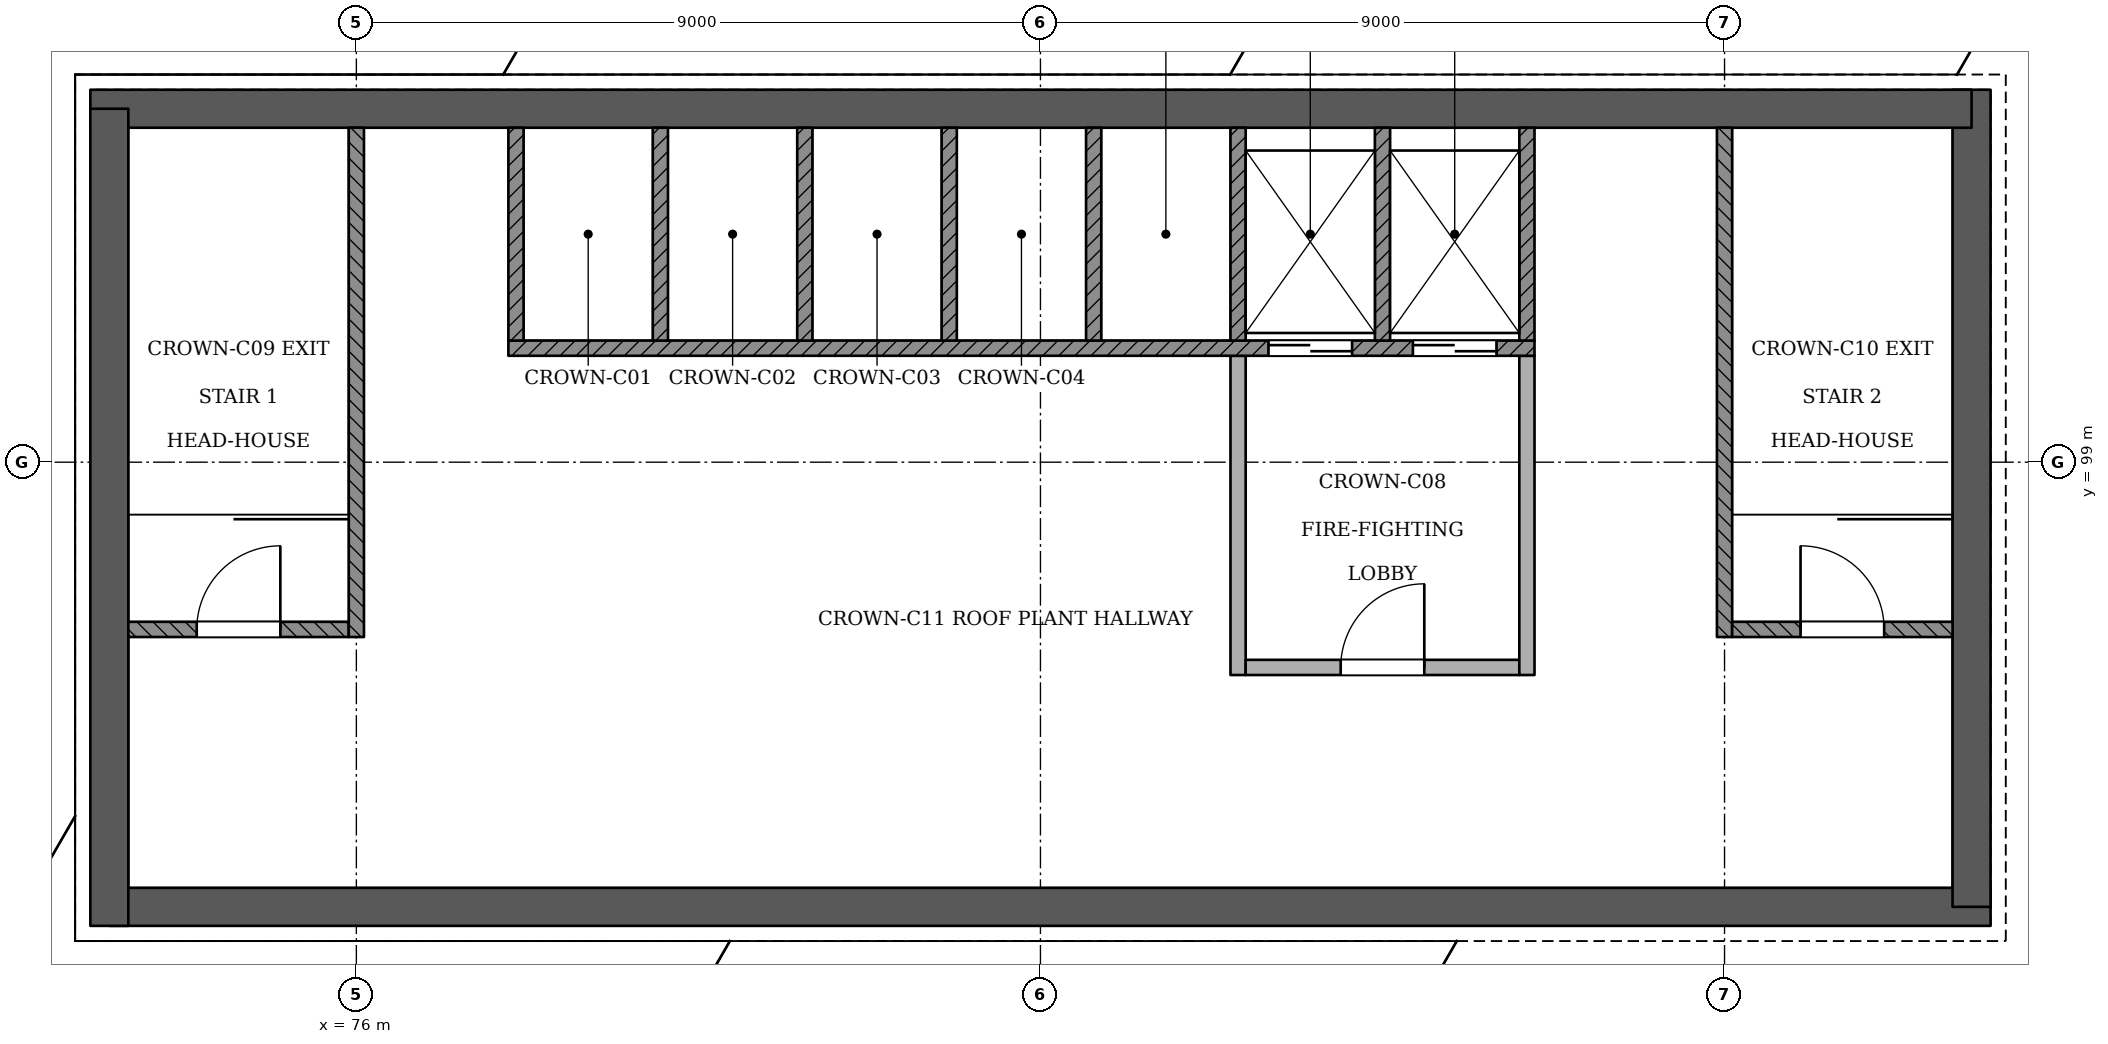
"""IFC4 building model, lengths in metres.
Left out: names, types, materials, properties, quantities, classifications, styles, units other than length and angle.
Written with IfcOpenShell. Run it as: python <this file> out.ifc"""

import sys

from ifc_helpers import new_model, si_unit, direction, frame, frame_2d, origin, place, context, subcontext, project, spatial, rectangle, extrude, element, fill, save


model = new_model("IFC4")
c1 = context("Model", 3, precision=1e-05, world=origin(), true_north=direction((0.0, 1.0)))
c2 = subcontext(c1, "Body", "Model", "MODEL_VIEW")
j1 = project(units=[si_unit("LENGTHUNIT", "METRE"), si_unit("PLANEANGLEUNIT", "RADIAN")], contexts=[c1])
p1 = place(None, origin())
s1 = spatial("IfcSite", under=j1, at=p1, CompositionType="ELEMENT")
p2 = place(p1, origin())
s2 = spatial("IfcBuilding", under=s1, at=p2, CompositionType="ELEMENT")
p3 = place(p2, frame((0.0, 0.0, 358.0)))
s3 = spatial("IfcBuildingStorey", under=s2, at=p3, CompositionType="ELEMENT", Elevation=358.0)
p4 = place(p3, frame((72.75, 93.15, 0.0), z_axis=(0.0, 0.0, 1.0), x_axis=(1.0, 0.0, 0.0)))
e1 = element("IfcWall", 1, at=p4, inside=s3, PredefinedType="SHEAR", context=c2, shape_type="SweptSolid", body=[
    extrude(rectangle(XDim=24.75, YDim=0.5, at=frame_2d((12.375, 0.0))), origin(), (0.0, 0.0, 1.0), 7.6),
])
p5 = place(p3, frame((97.25, 93.15, 0.0), z_axis=(0.0, 0.0, 1.0), x_axis=(0.0, 1.0, 0.0)))
e2 = element("IfcWall", 2, at=p5, inside=s3, PredefinedType="SHEAR", context=c2, shape_type="SweptSolid", body=[
    extrude(rectangle(XDim=10.75, YDim=0.5, at=frame_2d((5.375, 0.0))), origin(), (0.0, 0.0, 1.0), 7.6),
])
p6 = place(p3, frame((97.25, 103.65, 0.0), z_axis=(0.0, 0.0, 1.0), x_axis=(-1.0, 0.0, 0.0)))
e3 = element("IfcWall", 3, at=p6, inside=s3, PredefinedType="SHEAR", context=c2, shape_type="SweptSolid", body=[
    extrude(rectangle(XDim=24.75, YDim=0.5, at=frame_2d((12.375, 0.0))), origin(), (0.0, 0.0, 1.0), 7.6),
])
p7 = place(p3, frame((72.75, 103.65, 0.0), z_axis=(0.0, 0.0, 1.0), x_axis=(0.0, -1.0, 0.0)))
e4 = element("IfcWall", 4, at=p7, inside=s3, PredefinedType="SHEAR", context=c2, shape_type="SweptSolid", body=[
    extrude(rectangle(XDim=10.75, YDim=0.5, at=frame_2d((5.375, 0.0))), origin(), (0.0, 0.0, 1.0), 7.6),
])
p8 = place(p3, frame((87.6, 96.2, 0.0), z_axis=(0.0, 0.0, 1.0), x_axis=(0.0, 1.0, 0.0)))
e5 = element("IfcWall", 5, at=p8, inside=s3, PredefinedType="PARTITIONING", context=c2, shape_type="SweptSolid", body=[
    extrude(rectangle(XDim=4.2, YDim=0.2, at=frame_2d((2.1, 0.0))), origin(), (0.0, 0.0, 1.0), 6.4),
])
p9 = place(p3, frame((87.7, 96.3, 0.0), z_axis=(0.0, 0.0, 1.0), x_axis=(1.0, 0.0, 0.0)))
e6 = element("IfcWall", 6, at=p9, inside=s3, PredefinedType="PARTITIONING", context=c2, shape_type="SweptSolid", body=[
    extrude(rectangle(XDim=3.6, YDim=0.2, at=frame_2d((1.8, 0.0))), origin(), (0.0, 0.0, 1.0), 6.4),
])
p10 = place(p9, frame((1.25, 0.0, 0.0)))
e7 = element("IfcOpeningElement", 7, at=p10, cuts=e6, PredefinedType="OPENING", context=c2, shape_type="SweptSolid", body=[
    extrude(rectangle(XDim=1.1, YDim=2.1, at=frame_2d((0.55, 1.05))), frame((0.0, 0.11, 0.0), z_axis=(0.0, -1.0, 0.0), x_axis=(1.0, 0.0, 0.0)), (0.0, 0.0, 1.0), 0.221),
])
p11 = place(p3, frame((91.4, 96.2, 0.0), z_axis=(0.0, 0.0, 1.0), x_axis=(0.0, 1.0, 0.0)))
e8 = element("IfcWall", 8, at=p11, inside=s3, PredefinedType="PARTITIONING", context=c2, shape_type="SweptSolid", body=[
    extrude(rectangle(XDim=4.2, YDim=0.2, at=frame_2d((2.1, 0.0))), origin(), (0.0, 0.0, 1.0), 6.4),
])
p12 = place(p3, frame((73.0, 96.8, 0.0), z_axis=(0.0, 0.0, 1.0), x_axis=(1.0, 0.0, 0.0)))
e9 = element("IfcWall", 9, at=p12, inside=s3, PredefinedType="SOLIDWALL", context=c2, shape_type="SweptSolid", body=[
    extrude(rectangle(XDim=2.9, YDim=0.2, at=frame_2d((1.45, 0.0))), origin(), (0.0, 0.0, 1.0), 3.2),
])
p13 = place(p12, frame((0.9, 0.0, 0.0)))
e10 = element("IfcOpeningElement", 10, at=p13, cuts=e9, PredefinedType="OPENING", context=c2, shape_type="SweptSolid", body=[
    extrude(rectangle(XDim=1.1, YDim=2.1, at=frame_2d((0.55, 1.05))), frame((0.0, 0.11, 0.0), z_axis=(0.0, -1.0, 0.0), x_axis=(1.0, 0.0, 0.0)), (0.0, 0.0, 1.0), 0.221),
])
for number, where, z_axis, x_axis in (
    (11, (76.0, 96.7, 0.0), (0.0, 0.0, 1.0), (0.0, 1.0, 0.0)),
    (12, (94.0, 96.7, 0.0), (0.0, 0.0, 1.0), (0.0, 1.0, 0.0)),
):
    element("IfcWall", number, at=place(p3, frame(where, z_axis=z_axis, x_axis=x_axis)), inside=s3, PredefinedType="SOLIDWALL", context=c2, shape_type="SweptSolid", body=[
        extrude(rectangle(XDim=6.7, YDim=0.2, at=frame_2d((3.35, 0.0))), origin(), (0.0, 0.0, 1.0), 3.2),
    ])
p14 = place(p3, frame((94.1, 96.8, 0.0), z_axis=(0.0, 0.0, 1.0), x_axis=(1.0, 0.0, 0.0)))
e13 = element("IfcWall", 13, at=p14, inside=s3, PredefinedType="SOLIDWALL", context=c2, shape_type="SweptSolid", body=[
    extrude(rectangle(XDim=2.9, YDim=0.2, at=frame_2d((1.45, 0.0))), origin(), (0.0, 0.0, 1.0), 3.2),
])
p15 = place(p14, frame((0.9, 0.0, 0.0)))
e14 = element("IfcOpeningElement", 14, at=p15, cuts=e13, PredefinedType="OPENING", context=c2, shape_type="SweptSolid", body=[
    extrude(rectangle(XDim=1.1, YDim=2.1, at=frame_2d((0.55, 1.05))), frame((0.0, 0.11, 0.0), z_axis=(0.0, -1.0, 0.0), x_axis=(1.0, 0.0, 0.0)), (0.0, 0.0, 1.0), 0.221),
])
p16 = place(p3, frame((78.0, 100.5, 0.0), z_axis=(0.0, 0.0, 1.0), x_axis=(1.0, 0.0, 0.0)))
e15 = element("IfcWall", 15, at=p16, inside=s3, PredefinedType="SOLIDWALL", context=c2, shape_type="SweptSolid", body=[
    extrude(rectangle(XDim=13.5, YDim=0.2, at=frame_2d((6.75, 0.0))), origin(), (0.0, 0.0, 1.0), 6.4),
])
p17 = place(p16, frame((10.0, 0.0, 0.0)))
e16 = element("IfcOpeningElement", 16, at=p17, cuts=e15, PredefinedType="OPENING", context=c2, shape_type="SweptSolid", body=[
    extrude(rectangle(XDim=1.1, YDim=2.1, at=frame_2d((0.55, 1.05))), frame((0.0, 0.11, 0.0), z_axis=(0.0, -1.0, 0.0), x_axis=(1.0, 0.0, 0.0)), (0.0, 0.0, 1.0), 0.221),
])
p18 = place(p16, frame((11.9, 0.0, 0.0)))
e17 = element("IfcOpeningElement", 17, at=p18, cuts=e15, PredefinedType="OPENING", context=c2, shape_type="SweptSolid", body=[
    extrude(rectangle(XDim=1.1, YDim=2.1, at=frame_2d((0.55, 1.05))), frame((0.0, 0.11, 0.0), z_axis=(0.0, -1.0, 0.0), x_axis=(1.0, 0.0, 0.0)), (0.0, 0.0, 1.0), 0.221),
])
for number, where, z_axis, x_axis in (
    (18, (78.1, 100.6, 0.0), (0.0, 0.0, 1.0), (0.0, 1.0, 0.0)),
    (19, (80.0, 100.6, 0.0), (0.0, 0.0, 1.0), (0.0, 1.0, 0.0)),
    (20, (81.9, 100.6, 0.0), (0.0, 0.0, 1.0), (0.0, 1.0, 0.0)),
    (21, (83.8, 100.6, 0.0), (0.0, 0.0, 1.0), (0.0, 1.0, 0.0)),
    (22, (85.7, 100.6, 0.0), (0.0, 0.0, 1.0), (0.0, 1.0, 0.0)),
    (23, (87.6, 100.6, 0.0), (0.0, 0.0, 1.0), (0.0, 1.0, 0.0)),
    (24, (89.5, 100.6, 0.0), (0.0, 0.0, 1.0), (0.0, 1.0, 0.0)),
    (25, (91.4, 100.6, 0.0), (0.0, 0.0, 1.0), (0.0, 1.0, 0.0)),
):
    element("IfcWall", number, at=place(p3, frame(where, z_axis=z_axis, x_axis=x_axis)), inside=s3, PredefinedType="SOLIDWALL", context=c2, shape_type="SweptSolid", body=[
        extrude(rectangle(XDim=2.8, YDim=0.2, at=frame_2d((1.4, 0.0))), origin(), (0.0, 0.0, 1.0), 6.4),
    ])
p19 = place(p17, origin())
e26 = element("IfcDoor", 26, at=p19, inside=s3, OperationType="SLIDING_TO_RIGHT", PredefinedType="NOTDEFINED", context=c2, shape_type="SweptSolid", body=[
    extrude(rectangle(XDim=1.1, YDim=2.1, at=frame_2d((0.55, 1.05))), frame((0.0, 0.025, 0.0), z_axis=(0.0, -1.0, 0.0), x_axis=(1.0, 0.0, 0.0)), (0.0, 0.0, 1.0), 0.05),
])
fill(e16, e26)
p20 = place(p18, origin())
e27 = element("IfcDoor", 27, at=p20, inside=s3, OperationType="SLIDING_TO_LEFT", PredefinedType="NOTDEFINED", context=c2, shape_type="SweptSolid", body=[
    extrude(rectangle(XDim=1.1, YDim=2.1, at=frame_2d((0.55, 1.05))), frame((0.0, 0.025, 0.0), z_axis=(0.0, -1.0, 0.0), x_axis=(1.0, 0.0, 0.0)), (0.0, 0.0, 1.0), 0.05),
])
fill(e17, e27)
p21 = place(p10, origin())
e28 = element("IfcDoor", 28, at=p21, inside=s3, OperationType="SINGLE_SWING_RIGHT", PredefinedType="NOTDEFINED", context=c2, shape_type="SweptSolid", body=[
    extrude(rectangle(XDim=1.1, YDim=2.1, at=frame_2d((0.55, 1.05))), frame((0.0, 0.025, 0.0), z_axis=(0.0, -1.0, 0.0), x_axis=(1.0, 0.0, 0.0)), (0.0, 0.0, 1.0), 0.05),
])
fill(e7, e28)
p22 = place(p13, origin())
e29 = element("IfcDoor", 29, at=p22, inside=s3, OperationType="SINGLE_SWING_RIGHT", PredefinedType="NOTDEFINED", context=c2, shape_type="SweptSolid", body=[
    extrude(rectangle(XDim=1.1, YDim=2.1, at=frame_2d((0.55, 1.05))), frame((0.0, 0.025, 0.0), z_axis=(0.0, -1.0, 0.0), x_axis=(1.0, 0.0, 0.0)), (0.0, 0.0, 1.0), 0.05),
])
fill(e10, e29)
p23 = place(p15, origin())
e30 = element("IfcDoor", 30, at=p23, inside=s3, OperationType="SINGLE_SWING_LEFT", PredefinedType="NOTDEFINED", context=c2, shape_type="SweptSolid", body=[
    extrude(rectangle(XDim=1.1, YDim=2.1, at=frame_2d((0.55, 1.05))), frame((0.0, 0.025, 0.0), z_axis=(0.0, -1.0, 0.0), x_axis=(1.0, 0.0, 0.0)), (0.0, 0.0, 1.0), 0.05),
])
fill(e14, e30)
save(model, sys.argv[1])
